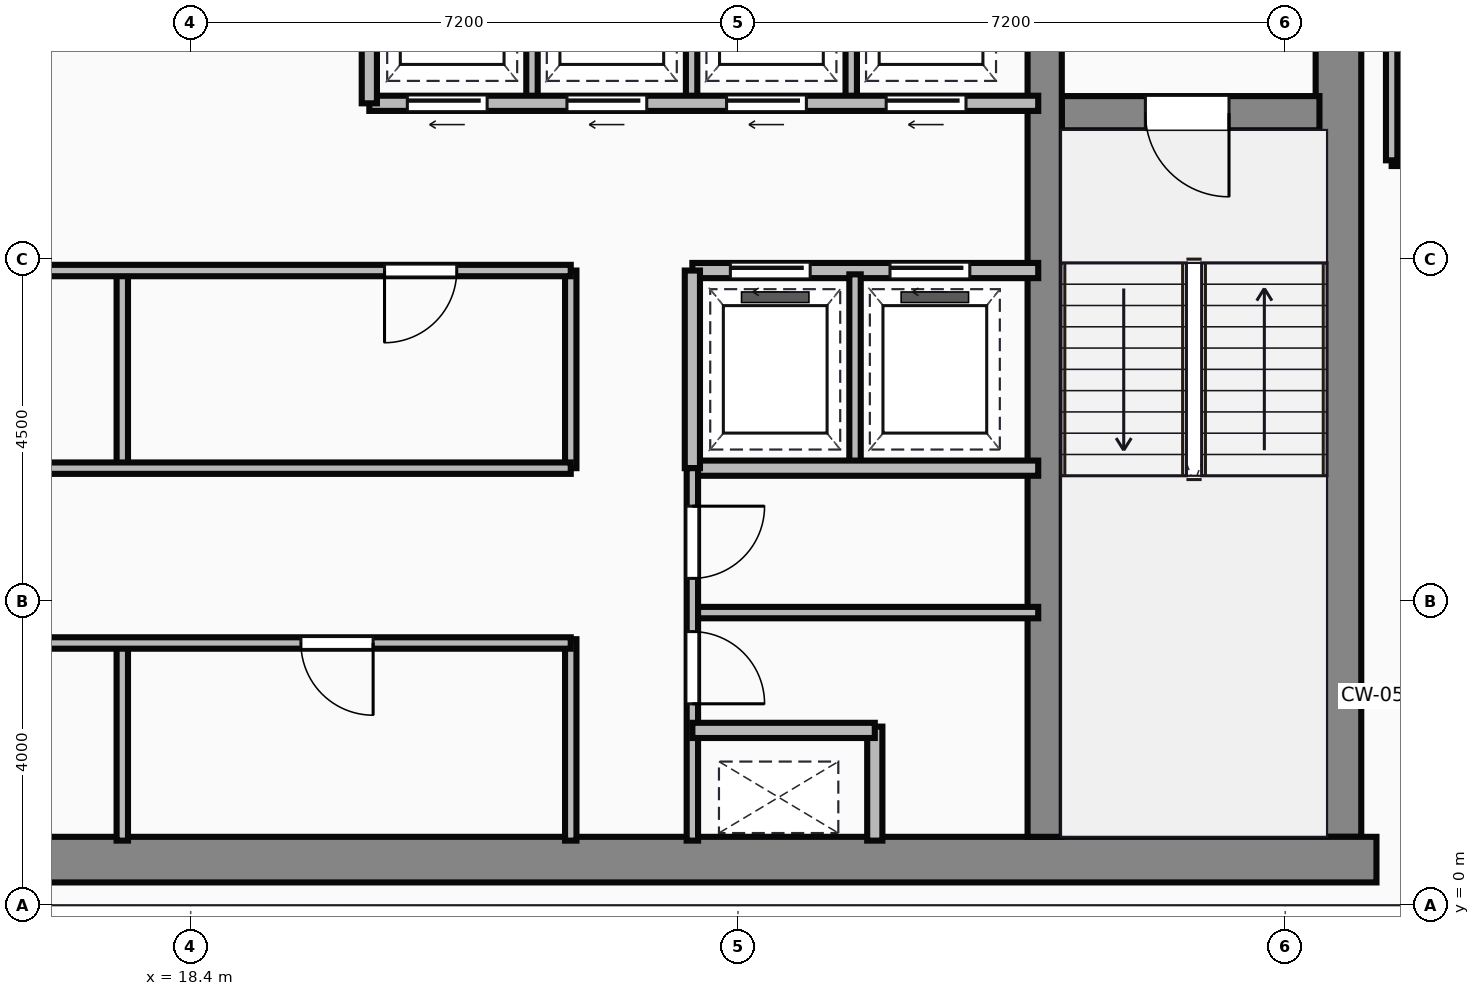
"""IFC4 building model, lengths in metres.
Left out: names, types, materials, properties, quantities, classifications, styles, units other than length and angle.
Written with IfcOpenShell. Run it as: python <this file> out.ifc"""

import sys

from ifc_helpers import new_model, si_unit, direction, frame, frame_2d, origin, place, context, subcontext, project, spatial, rectangle, extrude, source, transform, mapped, element, fill, save


model = new_model("IFC4")
c1 = context("Model", 3, precision=1e-05, world=origin(), true_north=direction((0.0, 1.0)))
c2 = subcontext(c1, "Body", "Model", "MODEL_VIEW")
j1 = project(units=[si_unit("LENGTHUNIT", "METRE"), si_unit("PLANEANGLEUNIT", "RADIAN")], contexts=[c1])
p1 = place(None, origin())
s1 = spatial("IfcSite", under=j1, at=p1, CompositionType="ELEMENT")
p2 = place(p1, origin())
s2 = spatial("IfcBuilding", under=s1, at=p2, CompositionType="ELEMENT")
p3 = place(p2, frame((0.0, 0.0, 251.5)))
s3 = spatial("IfcBuildingStorey", under=s2, at=p3, CompositionType="ELEMENT", Elevation=251.5)
m1 = source(origin(), c2, "Body", "SweptSolid", [
    extrude(rectangle(XDim=29.5, YDim=0.6, at=frame_2d((14.75, 0.0))), origin(), (0.0, 0.0, 1.0), 3.65),
])
p4 = place(p3, frame((4.5, 0.6, 0.0), z_axis=(0.0, 0.0, 1.0), x_axis=(1.0, 0.0, 0.0)))
e1 = element("IfcWall", 1, at=p4, inside=s3, PredefinedType="SHEAR", context=c2, shape_type="MappedRepresentation", body=[
    mapped(m1, transform((0.0, 0.0, 0.0))),
])
m2 = source(origin(), c2, "Body", "SweptSolid", [
    extrude(rectangle(XDim=13.1, YDim=0.6, at=frame_2d((6.55, 0.0))), origin(), (0.0, 0.0, 1.0), 3.65),
])
p5 = place(p3, frame((33.5, 0.9, 0.0), z_axis=(0.0, 0.0, 1.0), x_axis=(0.0, 1.0, 0.0)))
e2 = element("IfcWall", 2, at=p5, inside=s3, PredefinedType="SHEAR", context=c2, shape_type="MappedRepresentation", body=[
    mapped(m2, transform((0.0, 0.0, 0.0))),
])
m3 = source(origin(), c2, "Body", "SweptSolid", [
    extrude(rectangle(XDim=12.5, YDim=0.45, at=frame_2d((6.25, 0.0))), origin(), (0.0, 0.0, 1.0), 3.65),
])
p6 = place(p3, frame((29.635, 0.9, 0.0), z_axis=(0.0, 0.0, 1.0), x_axis=(0.0, 1.0, 0.0)))
e3 = element("IfcWall", 3, at=p6, inside=s3, PredefinedType="SHEAR", context=c2, shape_type="MappedRepresentation", body=[
    mapped(m3, transform((0.0, 0.0, 0.0))),
])
m4 = source(origin(), c2, "Body", "SweptSolid", [
    extrude(rectangle(XDim=3.39, YDim=0.45, at=frame_2d((1.695, 0.0))), origin(), (0.0, 0.0, 1.0), 3.65),
])
p7 = place(p3, frame((29.86, 10.42, 0.0), z_axis=(0.0, 0.0, 1.0), x_axis=(1.0, 0.0, 0.0)))
e4 = element("IfcWall", 4, at=p7, inside=s3, PredefinedType="SHEAR", context=c2, shape_type="MappedRepresentation", body=[
    mapped(m4, transform((0.0, 0.0, 0.0))),
])
p8 = place(p7, frame((1.1, 0.0, 0.0)))
e5 = element("IfcOpeningElement", 5, at=p8, cuts=e4, PredefinedType="OPENING", context=c2, shape_type="SweptSolid", body=[
    extrude(rectangle(XDim=1.1, YDim=2.15, at=frame_2d((0.55, 1.075))), frame((0.0, 0.235, 0.0), z_axis=(0.0, -1.0, 0.0), x_axis=(1.0, 0.0, 0.0)), (0.0, 0.0, 1.0), 0.47),
])
m5 = source(origin(), c2, "Body", "SweptSolid", [
    extrude(rectangle(XDim=10.35, YDim=0.15, at=frame_2d((5.175, 0.0))), origin(), (0.0, 0.0, 1.0), 3.4),
])
p9 = place(p3, frame((13.05, 3.45, 0.0), z_axis=(0.0, 0.0, 1.0), x_axis=(1.0, 0.0, 0.0)))
e6 = element("IfcWall", 6, at=p9, inside=s3, PredefinedType="PARTITIONING", context=c2, shape_type="MappedRepresentation", body=[
    mapped(m5, transform((0.0, 0.0, 0.0))),
])
p10 = place(p9, frame((2.1, 0.0, 0.0)))
e7 = element("IfcOpeningElement", 7, at=p10, cuts=e6, PredefinedType="OPENING", context=c2, shape_type="SweptSolid", body=[
    extrude(rectangle(XDim=0.95, YDim=2.15, at=frame_2d((0.475, 1.075))), frame((0.0, 0.085, 0.0), z_axis=(0.0, -1.0, 0.0), x_axis=(1.0, 0.0, 0.0)), (0.0, 0.0, 1.0), 0.17),
])
p11 = place(p9, frame((6.8, 0.0, 0.0)))
e8 = element("IfcOpeningElement", 8, at=p11, cuts=e6, PredefinedType="OPENING", context=c2, shape_type="SweptSolid", body=[
    extrude(rectangle(XDim=0.95, YDim=2.15, at=frame_2d((0.475, 1.075))), frame((0.0, 0.085, 0.0), z_axis=(0.0, -1.0, 0.0), x_axis=(1.0, 0.0, 0.0)), (0.0, 0.0, 1.0), 0.17),
])
m6 = source(origin(), c2, "Body", "SweptSolid", [
    extrude(rectangle(XDim=2.65, YDim=0.15, at=frame_2d((1.325, 0.0))), origin(), (0.0, 0.0, 1.0), 3.4),
])
p12 = place(p3, frame((23.4, 0.85, 0.0), z_axis=(0.0, 0.0, 1.0), x_axis=(0.0, 1.0, 0.0)))
e9 = element("IfcWall", 9, at=p12, inside=s3, PredefinedType="PARTITIONING", context=c2, shape_type="MappedRepresentation", body=[
    mapped(m6, transform((0.0, 0.0, 0.0))),
])
m7 = source(origin(), c2, "Body", "SweptSolid", [
    extrude(rectangle(XDim=2.6, YDim=0.15, at=frame_2d((1.3, 0.0))), origin(), (0.0, 0.0, 1.0), 3.4),
])
p13 = place(p3, frame((17.5, 0.85, 0.0), z_axis=(0.0, 0.0, 1.0), x_axis=(0.0, 1.0, 0.0)))
e10 = element("IfcWall", 10, at=p13, inside=s3, PredefinedType="PARTITIONING", context=c2, shape_type="MappedRepresentation", body=[
    mapped(m7, transform((0.0, 0.0, 0.0))),
])
m8 = source(origin(), c2, "Body", "SweptSolid", [
    extrude(rectangle(XDim=11.85, YDim=0.15, at=frame_2d((5.925, 0.0))), origin(), (0.0, 0.0, 1.0), 3.4),
])
p14 = place(p3, frame((11.55, 5.75, 0.0), z_axis=(0.0, 0.0, 1.0), x_axis=(1.0, 0.0, 0.0)))
e11 = element("IfcWall", 11, at=p14, inside=s3, PredefinedType="PARTITIONING", context=c2, shape_type="MappedRepresentation", body=[
    mapped(m8, transform((0.0, 0.0, 0.0))),
])
p15 = place(p3, frame((11.55, 8.35, 0.0), z_axis=(0.0, 0.0, 1.0), x_axis=(1.0, 0.0, 0.0)))
e12 = element("IfcWall", 12, at=p15, inside=s3, PredefinedType="PARTITIONING", context=c2, shape_type="MappedRepresentation", body=[
    mapped(m8, transform((0.0, 0.0, 0.0))),
])
p16 = place(p15, frame((1.1, 0.0, 0.0)))
e13 = element("IfcOpeningElement", 13, at=p16, cuts=e12, PredefinedType="OPENING", context=c2, shape_type="SweptSolid", body=[
    extrude(rectangle(XDim=0.95, YDim=2.15, at=frame_2d((0.475, 1.075))), frame((0.0, 0.085, 0.0), z_axis=(0.0, -1.0, 0.0), x_axis=(1.0, 0.0, 0.0)), (0.0, 0.0, 1.0), 0.17),
])
p17 = place(p15, frame((9.4, 0.0, 0.0)))
e14 = element("IfcOpeningElement", 14, at=p17, cuts=e12, PredefinedType="OPENING", context=c2, shape_type="SweptSolid", body=[
    extrude(rectangle(XDim=0.95, YDim=2.15, at=frame_2d((0.475, 1.075))), frame((0.0, 0.085, 0.0), z_axis=(0.0, -1.0, 0.0), x_axis=(1.0, 0.0, 0.0)), (0.0, 0.0, 1.0), 0.17),
])
m9 = source(origin(), c2, "Body", "SweptSolid", [
    extrude(rectangle(XDim=2.6, YDim=0.15, at=frame_2d((1.3, 0.0))), origin(), (0.0, 0.0, 1.0), 3.4),
])
p18 = place(p3, frame((23.4, 5.75, 0.0), z_axis=(0.0, 0.0, 1.0), x_axis=(0.0, 1.0, 0.0)))
e15 = element("IfcWall", 15, at=p18, inside=s3, PredefinedType="PARTITIONING", context=c2, shape_type="MappedRepresentation", body=[
    mapped(m9, transform((0.0, 0.0, 0.0))),
])
m10 = source(origin(), c2, "Body", "SweptSolid", [
    extrude(rectangle(XDim=2.5, YDim=0.15, at=frame_2d((1.25, 0.0))), origin(), (0.0, 0.0, 1.0), 3.4),
])
p19 = place(p3, frame((17.5, 5.8, 0.0), z_axis=(0.0, 0.0, 1.0), x_axis=(0.0, 1.0, 0.0)))
e16 = element("IfcWall", 16, at=p19, inside=s3, PredefinedType="PARTITIONING", context=c2, shape_type="MappedRepresentation", body=[
    mapped(m10, transform((0.0, 0.0, 0.0))),
])
m11 = source(origin(), c2, "Body", "SweptSolid", [
    extrude(rectangle(XDim=8.8, YDim=0.2, at=frame_2d((4.4, 0.0))), origin(), (0.0, 0.0, 1.0), 3.4),
])
p20 = place(p3, frame((20.75, 10.55, 0.0), z_axis=(0.0, 0.0, 1.0), x_axis=(1.0, 0.0, 0.0)))
e17 = element("IfcWall", 17, at=p20, inside=s3, PredefinedType="PARTITIONING", context=c2, shape_type="MappedRepresentation", body=[
    mapped(m11, transform((0.0, 0.0, 0.0))),
])
p21 = place(p20, frame((0.5, 0.0, 0.0)))
e18 = element("IfcOpeningElement", 18, at=p21, cuts=e17, PredefinedType="OPENING", context=c2, shape_type="SweptSolid", body=[
    extrude(rectangle(XDim=1.05, YDim=2.15, at=frame_2d((0.525, 1.075))), frame((0.0, 0.11, 0.0), z_axis=(0.0, -1.0, 0.0), x_axis=(1.0, 0.0, 0.0)), (0.0, 0.0, 1.0), 0.22),
])
p22 = place(p20, frame((2.6, 0.0, 0.0)))
e19 = element("IfcOpeningElement", 19, at=p22, cuts=e17, PredefinedType="OPENING", context=c2, shape_type="SweptSolid", body=[
    extrude(rectangle(XDim=1.05, YDim=2.15, at=frame_2d((0.525, 1.075))), frame((0.0, 0.11, 0.0), z_axis=(0.0, -1.0, 0.0), x_axis=(1.0, 0.0, 0.0)), (0.0, 0.0, 1.0), 0.22),
])
p23 = place(p20, frame((4.7, 0.0, 0.0)))
e20 = element("IfcOpeningElement", 20, at=p23, cuts=e17, PredefinedType="OPENING", context=c2, shape_type="SweptSolid", body=[
    extrude(rectangle(XDim=1.05, YDim=2.15, at=frame_2d((0.525, 1.075))), frame((0.0, 0.11, 0.0), z_axis=(0.0, -1.0, 0.0), x_axis=(1.0, 0.0, 0.0)), (0.0, 0.0, 1.0), 0.22),
])
p24 = place(p20, frame((6.8, 0.0, 0.0)))
e21 = element("IfcOpeningElement", 21, at=p24, cuts=e17, PredefinedType="OPENING", context=c2, shape_type="SweptSolid", body=[
    extrude(rectangle(XDim=1.05, YDim=2.15, at=frame_2d((0.525, 1.075))), frame((0.0, 0.11, 0.0), z_axis=(0.0, -1.0, 0.0), x_axis=(1.0, 0.0, 0.0)), (0.0, 0.0, 1.0), 0.22),
])
m12 = source(origin(), c2, "Body", "SweptSolid", [
    extrude(rectangle(XDim=3.0, YDim=0.2, at=frame_2d((1.5, 0.0))), origin(), (0.0, 0.0, 1.0), 3.4),
])
p25 = place(p3, frame((20.75, 10.55, 0.0), z_axis=(0.0, 0.0, 1.0), x_axis=(0.0, 1.0, 0.0)))
e22 = element("IfcWall", 22, at=p25, inside=s3, PredefinedType="PARTITIONING", context=c2, shape_type="MappedRepresentation", body=[
    mapped(m12, transform((0.0, 0.0, 0.0))),
])
m13 = source(origin(), c2, "Body", "SweptSolid", [
    extrude(rectangle(XDim=2.85, YDim=0.15, at=frame_2d((1.425, 0.0))), origin(), (0.0, 0.0, 1.0), 3.4),
])
for number, where, z_axis, x_axis in (
    (23, (22.89, 10.6, 0.0), (0.0, 0.0, 1.0), (0.0, 1.0, 0.0)),
    (24, (24.99, 10.6, 0.0), (0.0, 0.0, 1.0), (0.0, 1.0, 0.0)),
    (25, (27.09, 10.6, 0.0), (0.0, 0.0, 1.0), (0.0, 1.0, 0.0)),
):
    element("IfcWall", number, at=place(p3, frame(where, z_axis=z_axis, x_axis=x_axis)), inside=s3, PredefinedType="PARTITIONING", context=c2, shape_type="MappedRepresentation", body=[
        mapped(m13, transform((0.0, 0.0, 0.0))),
    ])
m14 = source(origin(), c2, "Body", "SweptSolid", [
    extrude(rectangle(XDim=4.55, YDim=0.2, at=frame_2d((2.275, 0.0))), origin(), (0.0, 0.0, 1.0), 3.4),
])
p26 = place(p3, frame((25.0, 8.35, 0.0), z_axis=(0.0, 0.0, 1.0), x_axis=(1.0, 0.0, 0.0)))
e26 = element("IfcWall", 26, at=p26, inside=s3, PredefinedType="PARTITIONING", context=c2, shape_type="MappedRepresentation", body=[
    mapped(m14, transform((0.0, 0.0, 0.0))),
])
p27 = place(p26, frame((0.5, 0.0, 0.0)))
e27 = element("IfcOpeningElement", 27, at=p27, cuts=e26, PredefinedType="OPENING", context=c2, shape_type="SweptSolid", body=[
    extrude(rectangle(XDim=1.05, YDim=2.15, at=frame_2d((0.525, 1.075))), frame((0.0, 0.11, 0.0), z_axis=(0.0, -1.0, 0.0), x_axis=(1.0, 0.0, 0.0)), (0.0, 0.0, 1.0), 0.22),
])
p28 = place(p26, frame((2.6, 0.0, 0.0)))
e28 = element("IfcOpeningElement", 28, at=p28, cuts=e26, PredefinedType="OPENING", context=c2, shape_type="SweptSolid", body=[
    extrude(rectangle(XDim=1.05, YDim=2.15, at=frame_2d((0.525, 1.075))), frame((0.0, 0.11, 0.0), z_axis=(0.0, -1.0, 0.0), x_axis=(1.0, 0.0, 0.0)), (0.0, 0.0, 1.0), 0.22),
])
p29 = place(p3, frame((25.0, 5.75, 0.0), z_axis=(0.0, 0.0, 1.0), x_axis=(1.0, 0.0, 0.0)))
e29 = element("IfcWall", 29, at=p29, inside=s3, PredefinedType="PARTITIONING", context=c2, shape_type="MappedRepresentation", body=[
    mapped(m14, transform((0.0, 0.0, 0.0))),
])
m15 = source(origin(), c2, "Body", "SweptSolid", [
    extrude(rectangle(XDim=2.6, YDim=0.2, at=frame_2d((1.3, 0.0))), origin(), (0.0, 0.0, 1.0), 3.4),
])
p30 = place(p3, frame((25.0, 5.75, 0.0), z_axis=(0.0, 0.0, 1.0), x_axis=(0.0, 1.0, 0.0)))
e30 = element("IfcWall", 30, at=p30, inside=s3, PredefinedType="PARTITIONING", context=c2, shape_type="MappedRepresentation", body=[
    mapped(m15, transform((0.0, 0.0, 0.0))),
])
p31 = place(p3, frame((27.14, 5.8, 0.0), z_axis=(0.0, 0.0, 1.0), x_axis=(0.0, 1.0, 0.0)))
e31 = element("IfcWall", 31, at=p31, inside=s3, PredefinedType="PARTITIONING", context=c2, shape_type="MappedRepresentation", body=[
    mapped(m10, transform((0.0, 0.0, 0.0))),
])
m16 = source(origin(), c2, "Body", "SweptSolid", [
    extrude(rectangle(XDim=4.9, YDim=0.15, at=frame_2d((2.45, 0.0))), origin(), (0.0, 0.0, 1.0), 3.4),
])
p32 = place(p3, frame((25.0, 0.85, 0.0), z_axis=(0.0, 0.0, 1.0), x_axis=(0.0, 1.0, 0.0)))
e32 = element("IfcWall", 32, at=p32, inside=s3, PredefinedType="PARTITIONING", context=c2, shape_type="MappedRepresentation", body=[
    mapped(m16, transform((0.0, 0.0, 0.0))),
])
p33 = place(p32, frame((1.8, 0.0, 0.0)))
e33 = element("IfcOpeningElement", 33, at=p33, cuts=e32, PredefinedType="OPENING", context=c2, shape_type="SweptSolid", body=[
    extrude(rectangle(XDim=0.95, YDim=2.15, at=frame_2d((0.475, 1.075))), frame((0.0, 0.085, 0.0), z_axis=(0.0, -1.0, 0.0), x_axis=(1.0, 0.0, 0.0)), (0.0, 0.0, 1.0), 0.17),
])
p34 = place(p32, frame((3.45, 0.0, 0.0)))
e34 = element("IfcOpeningElement", 34, at=p34, cuts=e32, PredefinedType="OPENING", context=c2, shape_type="SweptSolid", body=[
    extrude(rectangle(XDim=0.95, YDim=2.15, at=frame_2d((0.475, 1.075))), frame((0.0, 0.085, 0.0), z_axis=(0.0, -1.0, 0.0), x_axis=(1.0, 0.0, 0.0)), (0.0, 0.0, 1.0), 0.17),
])
m17 = source(origin(), c2, "Body", "SweptSolid", [
    extrude(rectangle(XDim=2.4, YDim=0.2, at=frame_2d((1.2, 0.0))), origin(), (0.0, 0.0, 1.0), 3.4),
])
p35 = place(p3, frame((25.0, 2.3, 0.0), z_axis=(0.0, 0.0, 1.0), x_axis=(1.0, 0.0, 0.0)))
e35 = element("IfcWall", 35, at=p35, inside=s3, PredefinedType="PARTITIONING", context=c2, shape_type="MappedRepresentation", body=[
    mapped(m17, transform((0.0, 0.0, 0.0))),
])
m18 = source(origin(), c2, "Body", "SweptSolid", [
    extrude(rectangle(XDim=1.5, YDim=0.2, at=frame_2d((0.75, 0.0))), origin(), (0.0, 0.0, 1.0), 3.4),
])
p36 = place(p3, frame((27.4, 0.85, 0.0), z_axis=(0.0, 0.0, 1.0), x_axis=(0.0, 1.0, 0.0)))
e36 = element("IfcWall", 36, at=p36, inside=s3, PredefinedType="PARTITIONING", context=c2, shape_type="MappedRepresentation", body=[
    mapped(m18, transform((0.0, 0.0, 0.0))),
])
m19 = source(origin(), c2, "Body", "SweptSolid", [
    extrude(rectangle(XDim=4.55, YDim=0.15, at=frame_2d((2.275, 0.0))), origin(), (0.0, 0.0, 1.0), 3.4),
])
p37 = place(p3, frame((25.0, 3.85, 0.0), z_axis=(0.0, 0.0, 1.0), x_axis=(1.0, 0.0, 0.0)))
e37 = element("IfcWall", 37, at=p37, inside=s3, PredefinedType="PARTITIONING", context=c2, shape_type="MappedRepresentation", body=[
    mapped(m19, transform((0.0, 0.0, 0.0))),
])
m20 = source(origin(), c2, "Body", "SweptSolid", [
    extrude(rectangle(XDim=4.8, YDim=0.15, at=frame_2d((2.4, 0.0))), origin(), (0.0, 0.0, 1.0), 3.4),
])
p38 = place(p3, frame((34.2, 9.8, 0.0), z_axis=(0.0, 0.0, 1.0), x_axis=(1.0, 0.0, 0.0)))
e38 = element("IfcWall", 38, at=p38, inside=s3, PredefinedType="PARTITIONING", context=c2, shape_type="MappedRepresentation", body=[
    mapped(m20, transform((0.0, 0.0, 0.0))),
])
m21 = source(origin(), c2, "Body", "SweptSolid", [
    extrude(rectangle(XDim=4.18, YDim=0.15, at=frame_2d((2.09, 0.0))), origin(), (0.0, 0.0, 1.0), 3.4),
])
p39 = place(p3, frame((34.2, 9.8, 0.0), z_axis=(0.0, 0.0, 1.0), x_axis=(0.0, 1.0, 0.0)))
e39 = element("IfcWall", 39, at=p39, inside=s3, PredefinedType="PARTITIONING", context=c2, shape_type="MappedRepresentation", body=[
    mapped(m21, transform((0.0, 0.0, 0.0))),
])
m22 = source(origin(), c2, "Body", "SweptSolid", [
    extrude(rectangle(XDim=1.1, YDim=2.15, at=frame_2d((0.55, 1.075))), frame((0.0, 0.025, 0.0), z_axis=(0.0, -1.0, 0.0), x_axis=(1.0, 0.0, 0.0)), (0.0, 0.0, 1.0), 0.05),
])
p40 = place(p8, frame((1.1, 0.0, 0.0), z_axis=(0.0, 0.0, 1.0), x_axis=(-1.0, 0.0, 0.0)))
e40 = element("IfcDoor", 40, at=p40, inside=s3, OperationType="SINGLE_SWING_RIGHT", PredefinedType="DOOR", context=c2, shape_type="MappedRepresentation", body=[
    mapped(m22, transform((0.0, 0.0, 0.0))),
])
fill(e5, e40)
m23 = source(origin(), c2, "Body", "SweptSolid", [
    extrude(rectangle(XDim=0.95, YDim=2.15, at=frame_2d((0.475, 1.075))), frame((0.0, 0.025, 0.0), z_axis=(0.0, -1.0, 0.0), x_axis=(1.0, 0.0, 0.0)), (0.0, 0.0, 1.0), 0.05),
])
p41 = place(p11, origin())
e41 = element("IfcDoor", 41, at=p41, inside=s3, OperationType="SINGLE_SWING_RIGHT", PredefinedType="DOOR", context=c2, shape_type="MappedRepresentation", body=[
    mapped(m23, transform((0.0, 0.0, 0.0))),
])
fill(e8, e41)
p42 = place(p17, origin())
e42 = element("IfcDoor", 42, at=p42, inside=s3, OperationType="SINGLE_SWING_LEFT", PredefinedType="DOOR", context=c2, shape_type="MappedRepresentation", body=[
    mapped(m23, transform((0.0, 0.0, 0.0))),
])
fill(e14, e42)
m24 = source(origin(), c2, "Body", "SweptSolid", [
    extrude(rectangle(XDim=1.05, YDim=2.15, at=frame_2d((0.525, 1.075))), frame((0.0, 0.025, 0.0), z_axis=(0.0, -1.0, 0.0), x_axis=(1.0, 0.0, 0.0)), (0.0, 0.0, 1.0), 0.05),
])
p43 = place(p21, frame((1.05, 0.0, 0.0), z_axis=(0.0, 0.0, 1.0), x_axis=(-1.0, 0.0, 0.0)))
e43 = element("IfcDoor", 43, at=p43, inside=s3, OperationType="SLIDING_TO_LEFT", PredefinedType="DOOR", context=c2, shape_type="MappedRepresentation", body=[
    mapped(m24, transform((0.0, 0.0, 0.0))),
])
fill(e18, e43)
p44 = place(p22, frame((1.05, 0.0, 0.0), z_axis=(0.0, 0.0, 1.0), x_axis=(-1.0, 0.0, 0.0)))
e44 = element("IfcDoor", 44, at=p44, inside=s3, OperationType="SLIDING_TO_LEFT", PredefinedType="DOOR", context=c2, shape_type="MappedRepresentation", body=[
    mapped(m24, transform((0.0, 0.0, 0.0))),
])
fill(e19, e44)
p45 = place(p23, frame((1.05, 0.0, 0.0), z_axis=(0.0, 0.0, 1.0), x_axis=(-1.0, 0.0, 0.0)))
e45 = element("IfcDoor", 45, at=p45, inside=s3, OperationType="SLIDING_TO_LEFT", PredefinedType="DOOR", context=c2, shape_type="MappedRepresentation", body=[
    mapped(m24, transform((0.0, 0.0, 0.0))),
])
fill(e20, e45)
p46 = place(p24, frame((1.05, 0.0, 0.0), z_axis=(0.0, 0.0, 1.0), x_axis=(-1.0, 0.0, 0.0)))
e46 = element("IfcDoor", 46, at=p46, inside=s3, OperationType="SLIDING_TO_LEFT", PredefinedType="DOOR", context=c2, shape_type="MappedRepresentation", body=[
    mapped(m24, transform((0.0, 0.0, 0.0))),
])
fill(e21, e46)
p47 = place(p27, origin())
e47 = element("IfcDoor", 47, at=p47, inside=s3, OperationType="SLIDING_TO_LEFT", PredefinedType="DOOR", context=c2, shape_type="MappedRepresentation", body=[
    mapped(m24, transform((0.0, 0.0, 0.0))),
])
fill(e27, e47)
p48 = place(p28, origin())
e48 = element("IfcDoor", 48, at=p48, inside=s3, OperationType="SLIDING_TO_LEFT", PredefinedType="DOOR", context=c2, shape_type="MappedRepresentation", body=[
    mapped(m24, transform((0.0, 0.0, 0.0))),
])
fill(e28, e48)
p49 = place(p33, origin())
e49 = element("IfcDoor", 49, at=p49, inside=s3, OperationType="SINGLE_SWING_LEFT", PredefinedType="DOOR", context=c2, shape_type="MappedRepresentation", body=[
    mapped(m23, transform((0.0, 0.0, 0.0))),
])
fill(e33, e49)
p50 = place(p34, origin())
e50 = element("IfcDoor", 50, at=p50, inside=s3, OperationType="SINGLE_SWING_RIGHT", PredefinedType="DOOR", context=c2, shape_type="MappedRepresentation", body=[
    mapped(m23, transform((0.0, 0.0, 0.0))),
])
fill(e34, e50)
save(model, sys.argv[1])
